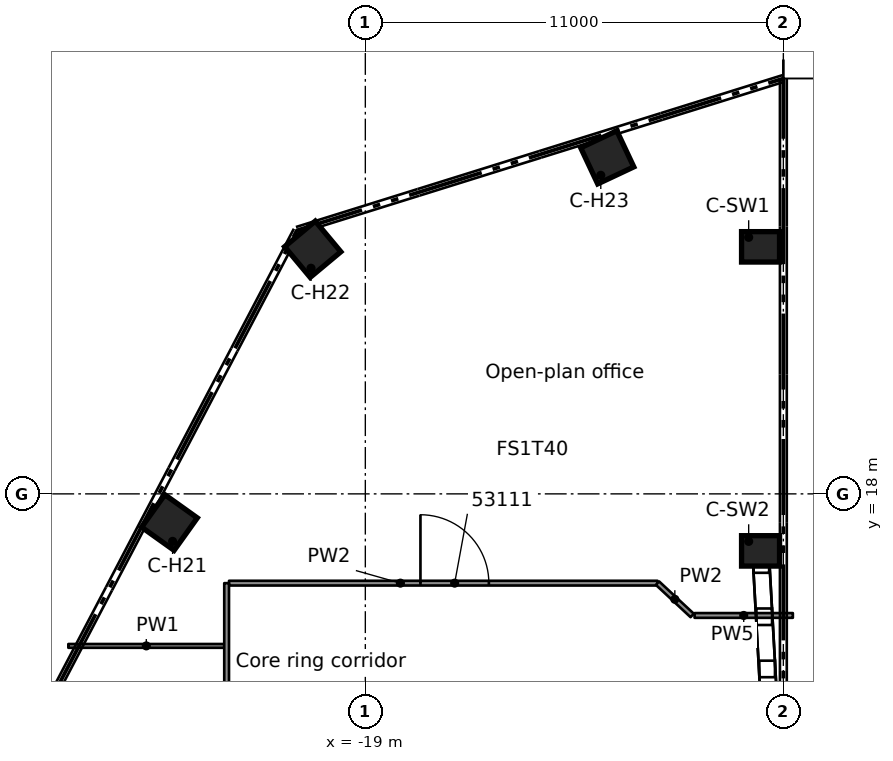
"""IFC4 building model, lengths in metres.
Left out: names, types, materials, properties, quantities, classifications, styles, units other than length and angle.
Written with IfcOpenShell. Run it as: python <this file> out.ifc"""

import sys

from ifc_helpers import new_model, si_unit, direction, frame, frame_2d, origin, origin_2d, place, context, subcontext, project, spatial, rectangle, extrude, element, fill, save


model = new_model("IFC4")
c1 = context("Model", 3, precision=1e-05, world=origin(), true_north=direction((0.0, 1.0)))
c2 = subcontext(c1, "Body", "Model", "MODEL_VIEW")
j1 = project(units=[si_unit("LENGTHUNIT", "METRE"), si_unit("PLANEANGLEUNIT", "RADIAN")], contexts=[c1])
p1 = place(None, origin())
s1 = spatial("IfcSite", under=j1, at=p1, CompositionType="ELEMENT")
p2 = place(p1, origin())
s2 = spatial("IfcBuilding", under=s1, at=p2, CompositionType="ELEMENT")
p3 = place(p2, frame((0.0, 0.0, 267.5)))
s3 = spatial("IfcBuildingStorey", under=s2, at=p3, CompositionType="ELEMENT", Elevation=267.5)
for number, where, z_axis, x_axis in (
    (1, (-24.154, 17.246, 0.0), (0.0, 0.0, 1.0), (-0.814, 0.581, 0.0)),
    (2, (-20.384, 24.437, 0.0), (0.0, 0.0, 1.0), (-0.641, 0.768, 0.0)),
    (3, (-12.634, 26.855, 0.0), (0.0, 0.0, 1.0), (-0.426, 0.905, 0.0)),
):
    element("IfcColumn", number, at=place(p3, frame(where, z_axis=z_axis, x_axis=x_axis)), inside=s3, PredefinedType="COLUMN", context=c2, shape_type="SweptSolid", body=[
        extrude(rectangle(XDim=1.05, YDim=1.05, at=origin_2d()), origin(), (0.0, 0.0, 1.0), 3.5),
    ])
for number, where, z_axis, x_axis in (
    (4, (-8.6, 24.5, 0.0), (0.0, 0.0, 1.0), (1.0, 0.0, 0.0)),
    (5, (-8.6, 16.5, 0.0), (0.0, 0.0, 1.0), (1.0, 0.0, 0.0)),
):
    element("IfcColumn", number, at=place(p3, frame(where, z_axis=z_axis, x_axis=x_axis)), inside=s3, PredefinedType="COLUMN", context=c2, shape_type="SweptSolid", body=[
        extrude(rectangle(XDim=1.0, YDim=0.8, at=origin_2d()), origin(), (0.0, 0.0, 1.0), 3.5),
    ])
p4 = place(p3, frame((-26.815, 14.0, 0.0), z_axis=(0.0, 0.0, 1.0), x_axis=(1.0, 0.0, 0.0)))
e6 = element("IfcWall", 6, at=p4, inside=s3, PredefinedType="PARTITIONING", context=c2, shape_type="SweptSolid", body=[
    extrude(rectangle(XDim=4.103, YDim=0.1, at=frame_2d((2.052, 0.0))), origin(), (0.0, 0.0, 1.0), 3.03),
])
p5 = place(p3, frame((-10.336, 14.801, 0.0), z_axis=(0.0, 0.0, 1.0), x_axis=(1.0, 0.0, 0.0)))
e7 = element("IfcWall", 7, at=p5, inside=s3, PredefinedType="PARTITIONING", context=c2, shape_type="SweptSolid", body=[
    extrude(rectangle(XDim=2.586, YDim=0.125, at=frame_2d((1.293, 0.0))), origin(), (0.0, 0.0, 1.0), 2.496),
])
p6 = place(p3, frame((-22.587, 15.651, 0.0), z_axis=(0.0, 0.0, 1.0), x_axis=(1.0, 0.0, 0.0)))
e8 = element("IfcWall", 8, at=p6, inside=s3, PredefinedType="PARTITIONING", context=c2, shape_type="SweptSolid", body=[
    extrude(rectangle(XDim=11.275, YDim=0.125, at=frame_2d((5.637, 0.0))), origin(), (0.0, 0.0, 1.0), 3.03),
])
p7 = place(p6, frame((5.038, 0.0, 0.0)))
e9 = element("IfcOpeningElement", 9, at=p7, cuts=e8, PredefinedType="OPENING", context=c2, shape_type="SweptSolid", body=[
    extrude(rectangle(XDim=1.8, YDim=2.1, at=frame_2d((0.9, 1.05))), frame((0.0, 0.073, 0.0), z_axis=(0.0, -1.0, 0.0), x_axis=(1.0, 0.0, 0.0)), (0.0, 0.0, 1.0), 0.145),
])
p8 = place(p3, frame((-10.399, 14.801, 0.0), z_axis=(0.0, 0.0, 1.0), x_axis=(-0.731998309082, 0.681306447571, 0.0)))
e10 = element("IfcWall", 10, at=p8, inside=s3, PredefinedType="PARTITIONING", context=c2, shape_type="SweptSolid", body=[
    extrude(rectangle(XDim=1.247, YDim=0.125, at=frame_2d((0.624, 0.0))), origin(), (0.0, 0.0, 1.0), 3.03),
])
p9 = place(p3, frame((-22.65, -15.651, 0.0), z_axis=(0.0, 0.0, 1.0), x_axis=(0.0, 1.0, 0.0)))
e11 = element("IfcWall", 11, at=p9, inside=s3, PredefinedType="PARTITIONING", context=c2, shape_type="SweptSolid", body=[
    extrude(rectangle(XDim=31.302, YDim=0.125, at=frame_2d((15.651, 0.0))), origin(), (0.0, 0.0, 1.0), 3.03),
])
p10 = place(p9, frame((4.001, 0.0, 0.0)))
e12 = element("IfcOpeningElement", 12, at=p10, cuts=e11, PredefinedType="OPENING", context=c2, shape_type="SweptSolid", body=[
    extrude(rectangle(XDim=0.9, YDim=2.1, at=frame_2d((0.45, 1.05))), frame((0.0, 0.073, 0.0), z_axis=(0.0, -1.0, 0.0), x_axis=(1.0, 0.0, 0.0)), (0.0, 0.0, 1.0), 0.145),
])
p11 = place(p9, frame((0.35, 0.0, 0.0)))
e13 = element("IfcOpeningElement", 13, at=p11, cuts=e11, PredefinedType="OPENING", context=c2, shape_type="SweptSolid", body=[
    extrude(rectangle(XDim=0.9, YDim=2.1, at=frame_2d((0.45, 1.05))), frame((0.0, 0.073, 0.0), z_axis=(0.0, -1.0, 0.0), x_axis=(1.0, 0.0, 0.0)), (0.0, 0.0, 1.0), 0.145),
])
p12 = place(p9, frame((26.245, 0.0, 0.0)))
e14 = element("IfcOpeningElement", 14, at=p12, cuts=e11, PredefinedType="OPENING", context=c2, shape_type="SweptSolid", body=[
    extrude(rectangle(XDim=0.9, YDim=2.1, at=frame_2d((0.45, 1.05))), frame((0.0, 0.073, 0.0), z_axis=(0.0, -1.0, 0.0), x_axis=(1.0, 0.0, 0.0)), (0.0, 0.0, 1.0), 0.145),
])
p13 = place(p9, frame((14.757, 0.0, 0.0)))
e15 = element("IfcOpeningElement", 15, at=p13, cuts=e11, PredefinedType="OPENING", context=c2, shape_type="SweptSolid", body=[
    extrude(rectangle(XDim=1.8, YDim=2.1, at=frame_2d((0.9, 1.05))), frame((0.0, 0.073, 0.0), z_axis=(0.0, -1.0, 0.0), x_axis=(1.0, 0.0, 0.0)), (0.0, 0.0, 1.0), 0.145),
])
p14 = place(p7, origin())
e16 = element("IfcDoor", 16, at=p14, inside=s3, OperationType="DOUBLE_DOOR_SINGLE_SWING", PredefinedType="DOOR", context=c2, shape_type="SweptSolid", body=[
    extrude(rectangle(XDim=1.8, YDim=2.1, at=frame_2d((0.9, 1.05))), frame((0.0, 0.025, 0.0), z_axis=(0.0, -1.0, 0.0), x_axis=(1.0, 0.0, 0.0)), (0.0, 0.0, 1.0), 0.05),
])
fill(e9, e16)
save(model, sys.argv[1])
